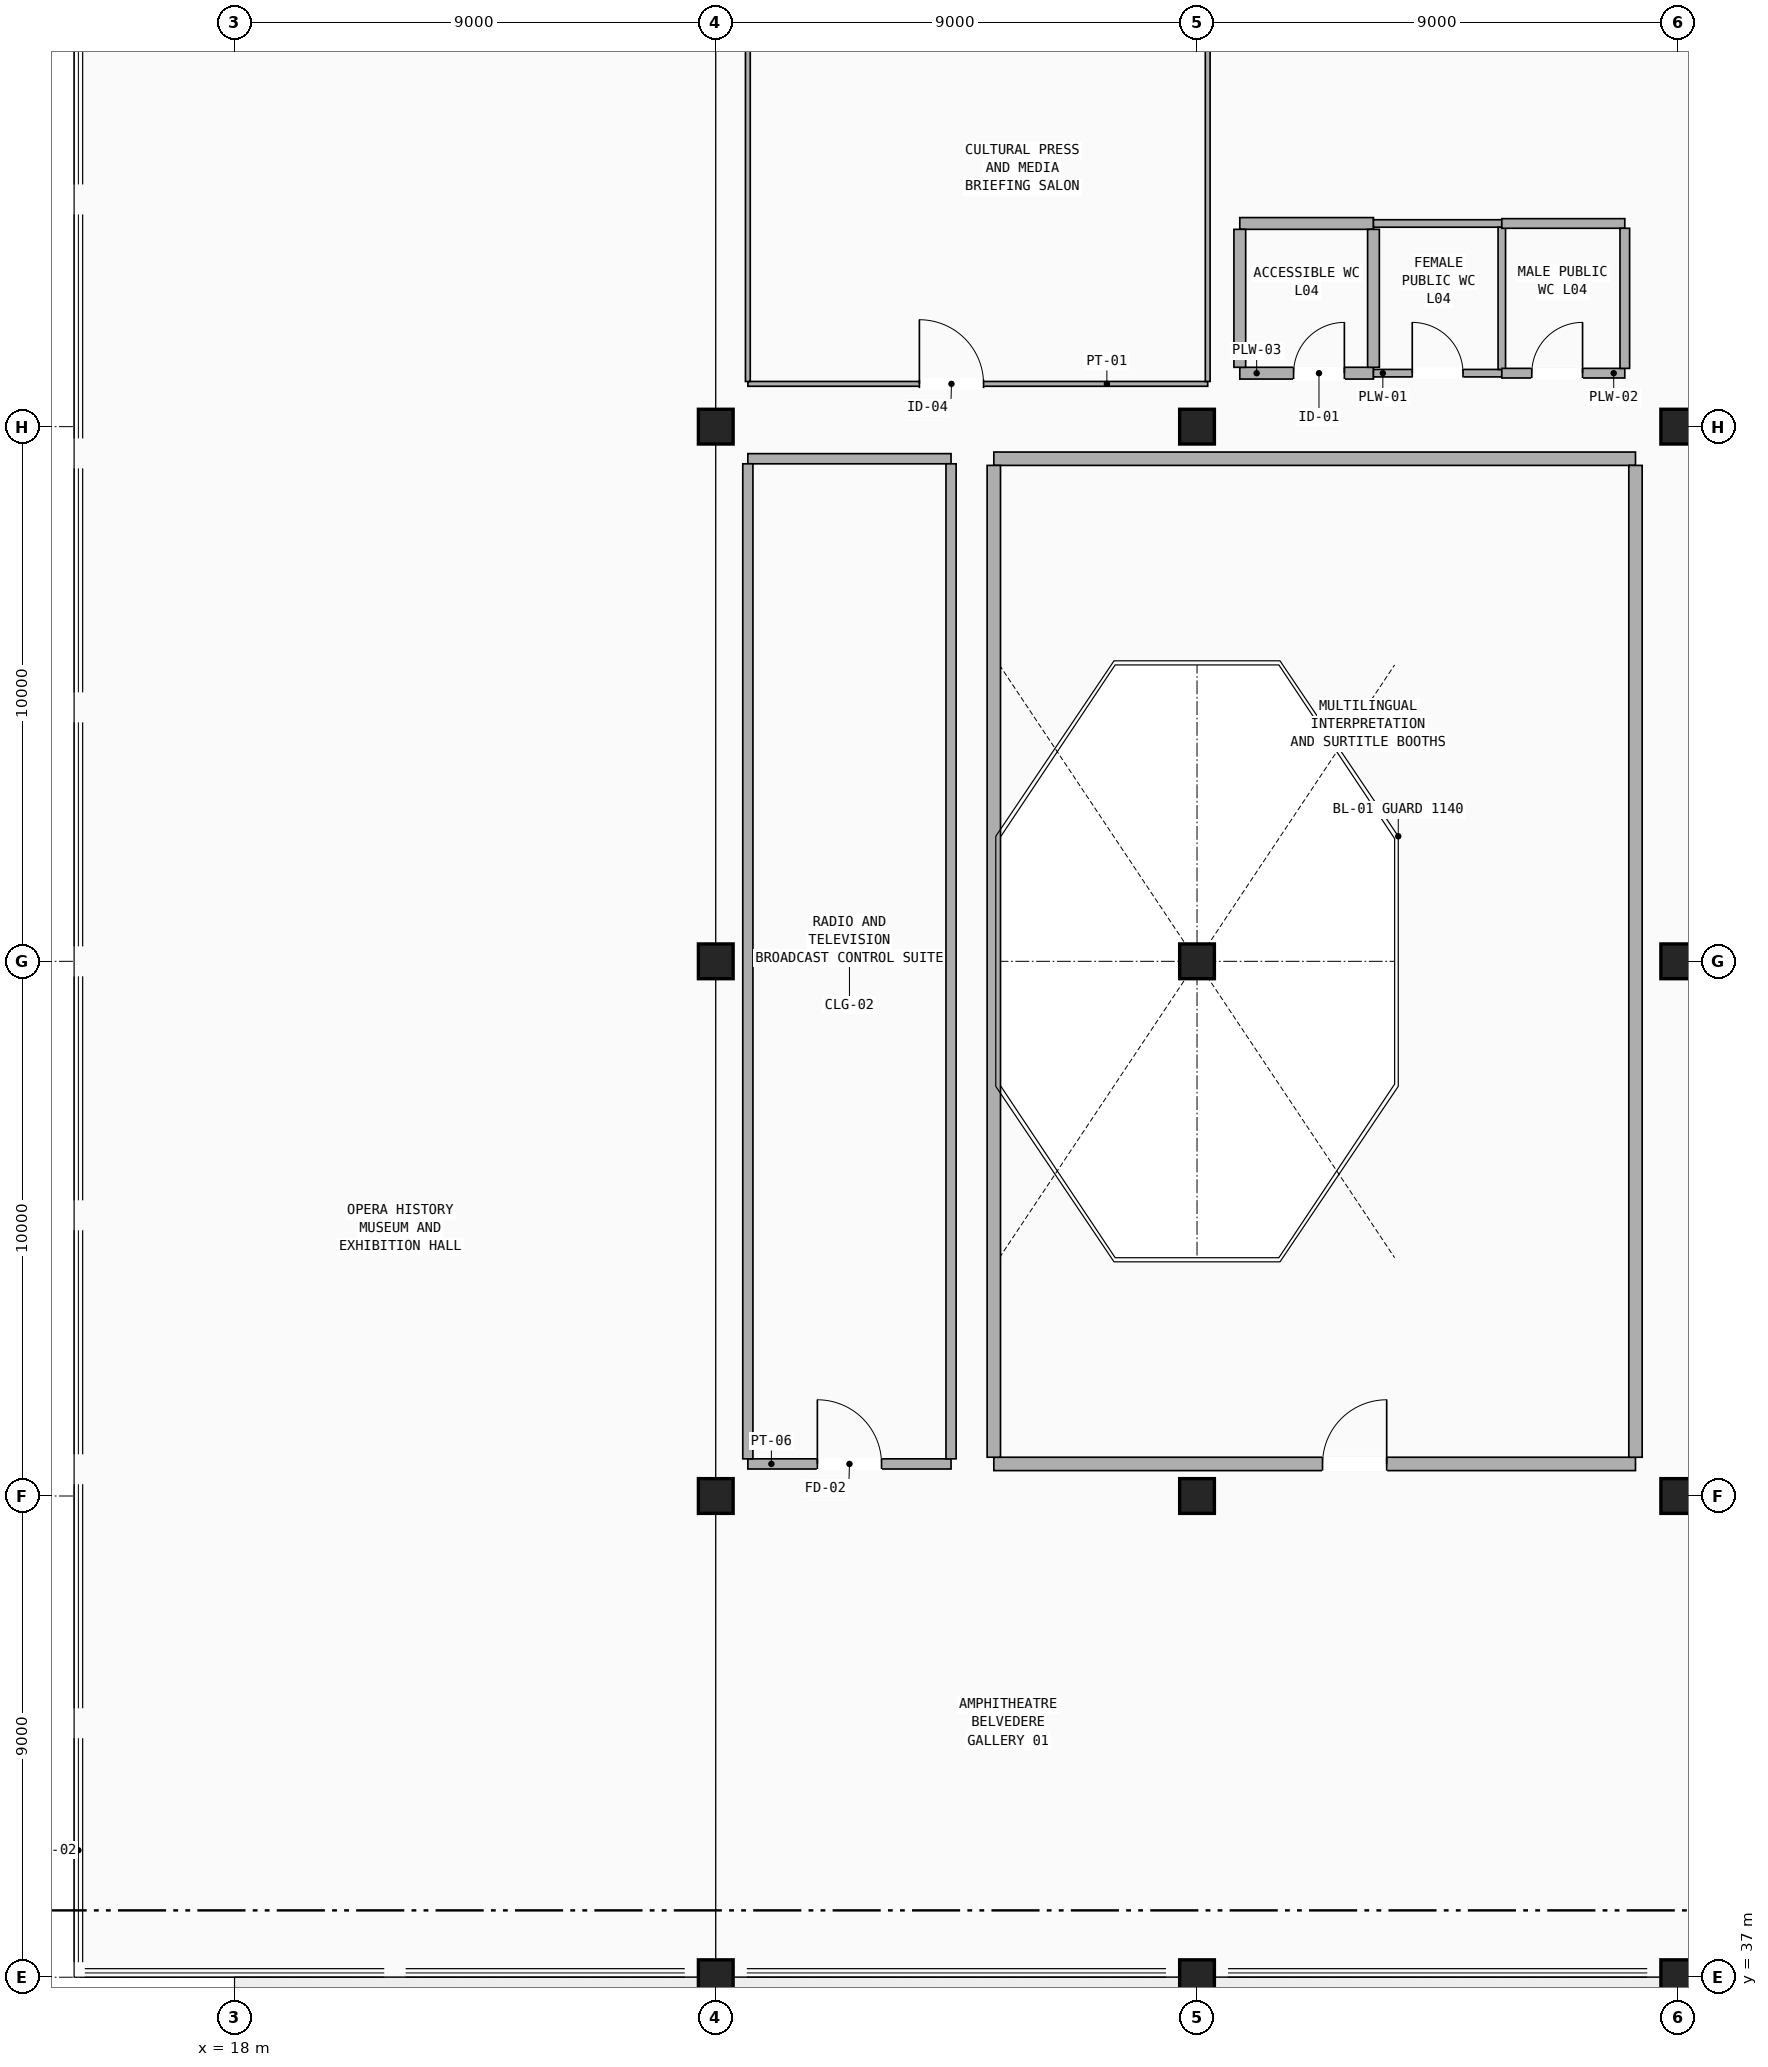
"""IFC4 building model, lengths in metres.
Left out: names, types, materials, properties, quantities, classifications, styles, units other than length and angle.
Written with IfcOpenShell. Run it as: python <this file> out.ifc"""

import sys

from ifc_helpers import new_model, si_unit, direction, frame, frame_2d, origin, origin_2d, place, context, subcontext, project, spatial, rectangle, extrude, element, fill, save


model = new_model("IFC4")
c1 = context("Model", 3, precision=1e-05, world=origin(), true_north=direction((0.0, 1.0)))
c2 = subcontext(c1, "Body", "Model", "MODEL_VIEW")
j1 = project(units=[si_unit("LENGTHUNIT", "METRE"), si_unit("PLANEANGLEUNIT", "RADIAN")], contexts=[c1])
p1 = place(None, origin())
s1 = spatial("IfcSite", under=j1, at=p1, CompositionType="ELEMENT")
p2 = place(p1, origin())
s2 = spatial("IfcBuilding", under=s1, at=p2, CompositionType="ELEMENT")
p3 = place(p2, frame((0.0, 0.0, 17.68)))
s3 = spatial("IfcBuildingStorey", under=s2, at=p3, CompositionType="ELEMENT", Elevation=17.68)
for number, where, z_axis, x_axis in (
    (1, (27.0, 37.0, 0.0), (0.0, 0.0, 1.0), (1.0, 0.0, 0.0)),
    (2, (27.0, 46.0, 0.0), (0.0, 0.0, 1.0), (1.0, 0.0, 0.0)),
    (3, (27.0, 56.0, 0.0), (0.0, 0.0, 1.0), (1.0, 0.0, 0.0)),
    (4, (27.0, 66.0, 0.0), (0.0, 0.0, 1.0), (1.0, 0.0, 0.0)),
    (5, (36.0, 37.0, 0.0), (0.0, 0.0, 1.0), (1.0, 0.0, 0.0)),
    (6, (36.0, 46.0, 0.0), (0.0, 0.0, 1.0), (1.0, 0.0, 0.0)),
    (7, (36.0, 56.0, 0.0), (0.0, 0.0, 1.0), (1.0, 0.0, 0.0)),
    (8, (36.0, 66.0, 0.0), (0.0, 0.0, 1.0), (1.0, 0.0, 0.0)),
    (9, (45.0, 37.0, 0.0), (0.0, 0.0, 1.0), (1.0, 0.0, 0.0)),
    (10, (45.0, 46.0, 0.0), (0.0, 0.0, 1.0), (1.0, 0.0, 0.0)),
    (11, (45.0, 56.0, 0.0), (0.0, 0.0, 1.0), (1.0, 0.0, 0.0)),
    (12, (45.0, 66.0, 0.0), (0.0, 0.0, 1.0), (1.0, 0.0, 0.0)),
):
    element("IfcColumn", number, at=place(p3, frame(where, z_axis=z_axis, x_axis=x_axis)), inside=s3, PredefinedType="COLUMN", context=c2, shape_type="SweptSolid", body=[
        extrude(rectangle(XDim=0.65, YDim=0.65, at=origin_2d()), origin(), (0.0, 0.0, 1.0), 4.08),
    ])
p4 = place(p3, frame((36.8, 67.0, 0.0), z_axis=(0.0, 0.0, 1.0), x_axis=(1.0, 0.0, 0.0)))
e13 = element("IfcWall", 13, at=p4, inside=s3, PredefinedType="PLUMBINGWALL", context=c2, shape_type="SweptSolid", body=[
    extrude(rectangle(XDim=2.5, YDim=0.22, at=frame_2d((1.25, 0.0))), origin(), (0.0, 0.0, 1.0), 3.84),
])
p5 = place(p4, frame((1.006, 0.0, 0.0)))
e14 = element("IfcOpeningElement", 14, at=p5, cuts=e13, PredefinedType="OPENING", context=c2, shape_type="SweptSolid", body=[
    extrude(rectangle(XDim=0.95, YDim=2.15, at=frame_2d((0.475, 1.075))), frame((0.0, 0.12, 0.0), z_axis=(0.0, -1.0, 0.0), x_axis=(1.0, 0.0, 0.0)), (0.0, 0.0, 1.0), 0.24),
])
p6 = place(p3, frame((36.8, 69.8, 0.0), z_axis=(0.0, 0.0, 1.0), x_axis=(1.0, 0.0, 0.0)))
e15 = element("IfcWall", 15, at=p6, inside=s3, PredefinedType="PLUMBINGWALL", context=c2, shape_type="SweptSolid", body=[
    extrude(rectangle(XDim=2.5, YDim=0.22, at=frame_2d((1.25, 0.0))), origin(), (0.0, 0.0, 1.0), 3.84),
])
for number, where, z_axis, x_axis in (
    (16, (36.8, 67.11, 0.0), (0.0, 0.0, 1.0), (0.0, 1.0, 0.0)),
    (17, (39.3, 67.11, 0.0), (0.0, 0.0, 1.0), (0.0, 1.0, 0.0)),
):
    element("IfcWall", number, at=place(p3, frame(where, z_axis=z_axis, x_axis=x_axis)), inside=s3, PredefinedType="PLUMBINGWALL", context=c2, shape_type="SweptSolid", body=[
        extrude(rectangle(XDim=2.58, YDim=0.22, at=frame_2d((1.29, 0.0))), origin(), (0.0, 0.0, 1.0), 3.84),
    ])
p7 = place(p3, frame((39.3, 67.0, 0.0), z_axis=(0.0, 0.0, 1.0), x_axis=(1.0, 0.0, 0.0)))
e18 = element("IfcWall", 18, at=p7, inside=s3, PredefinedType="PLUMBINGWALL", context=c2, shape_type="SweptSolid", body=[
    extrude(rectangle(XDim=2.4, YDim=0.14, at=frame_2d((1.2, 0.0))), origin(), (0.0, 0.0, 1.0), 3.84),
])
p8 = place(p7, frame((0.725, 0.0, 0.0)))
e19 = element("IfcOpeningElement", 19, at=p8, cuts=e18, PredefinedType="OPENING", context=c2, shape_type="SweptSolid", body=[
    extrude(rectangle(XDim=0.95, YDim=2.15, at=frame_2d((0.475, 1.075))), frame((0.0, 0.08, 0.0), z_axis=(0.0, -1.0, 0.0), x_axis=(1.0, 0.0, 0.0)), (0.0, 0.0, 1.0), 0.16),
])
p9 = place(p3, frame((39.3, 69.8, 0.0), z_axis=(0.0, 0.0, 1.0), x_axis=(1.0, 0.0, 0.0)))
e20 = element("IfcWall", 20, at=p9, inside=s3, PredefinedType="PLUMBINGWALL", context=c2, shape_type="SweptSolid", body=[
    extrude(rectangle(XDim=2.4, YDim=0.14, at=frame_2d((1.2, 0.0))), origin(), (0.0, 0.0, 1.0), 3.84),
])
p10 = place(p3, frame((41.7, 67.07, 0.0), z_axis=(0.0, 0.0, 1.0), x_axis=(0.0, 1.0, 0.0)))
e21 = element("IfcWall", 21, at=p10, inside=s3, PredefinedType="PLUMBINGWALL", context=c2, shape_type="SweptSolid", body=[
    extrude(rectangle(XDim=2.66, YDim=0.14, at=frame_2d((1.33, 0.0))), origin(), (0.0, 0.0, 1.0), 3.84),
])
p11 = place(p3, frame((41.7, 67.0, 0.0), z_axis=(0.0, 0.0, 1.0), x_axis=(1.0, 0.0, 0.0)))
e22 = element("IfcWall", 22, at=p11, inside=s3, PredefinedType="PLUMBINGWALL", context=c2, shape_type="SweptSolid", body=[
    extrude(rectangle(XDim=2.3, YDim=0.18, at=frame_2d((1.15, 0.0))), origin(), (0.0, 0.0, 1.0), 3.84),
])
p12 = place(p11, frame((0.56, 0.0, 0.0)))
e23 = element("IfcOpeningElement", 23, at=p12, cuts=e22, PredefinedType="OPENING", context=c2, shape_type="SweptSolid", body=[
    extrude(rectangle(XDim=0.95, YDim=2.15, at=frame_2d((0.475, 1.075))), frame((0.0, 0.1, 0.0), z_axis=(0.0, -1.0, 0.0), x_axis=(1.0, 0.0, 0.0)), (0.0, 0.0, 1.0), 0.2),
])
p13 = place(p3, frame((41.7, 69.8, 0.0), z_axis=(0.0, 0.0, 1.0), x_axis=(1.0, 0.0, 0.0)))
e24 = element("IfcWall", 24, at=p13, inside=s3, PredefinedType="PLUMBINGWALL", context=c2, shape_type="SweptSolid", body=[
    extrude(rectangle(XDim=2.3, YDim=0.18, at=frame_2d((1.15, 0.0))), origin(), (0.0, 0.0, 1.0), 3.84),
])
p14 = place(p3, frame((44.0, 67.09, 0.0), z_axis=(0.0, 0.0, 1.0), x_axis=(0.0, 1.0, 0.0)))
e25 = element("IfcWall", 25, at=p14, inside=s3, PredefinedType="PLUMBINGWALL", context=c2, shape_type="SweptSolid", body=[
    extrude(rectangle(XDim=2.62, YDim=0.18, at=frame_2d((1.31, 0.0))), origin(), (0.0, 0.0, 1.0), 3.84),
])
p15 = place(p3, frame((27.6, 46.6, 0.0), z_axis=(0.0, 0.0, 1.0), x_axis=(1.0, 0.0, 0.0)))
e26 = element("IfcWall", 26, at=p15, inside=s3, PredefinedType="PARTITIONING", context=c2, shape_type="SweptSolid", body=[
    extrude(rectangle(XDim=3.8, YDim=0.19, at=frame_2d((1.9, 0.0))), origin(), (0.0, 0.0, 1.0), 3.84),
])
p16 = place(p15, frame((1.3, 0.0, 0.0)))
e27 = element("IfcOpeningElement", 27, at=p16, cuts=e26, PredefinedType="OPENING", context=c2, shape_type="SweptSolid", body=[
    extrude(rectangle(XDim=1.2, YDim=2.2, at=frame_2d((0.6, 1.1))), frame((0.0, 0.105, 0.0), z_axis=(0.0, -1.0, 0.0), x_axis=(1.0, 0.0, 0.0)), (0.0, 0.0, 1.0), 0.21),
])
p17 = place(p3, frame((27.6, 65.4, 0.0), z_axis=(0.0, 0.0, 1.0), x_axis=(1.0, 0.0, 0.0)))
e28 = element("IfcWall", 28, at=p17, inside=s3, PredefinedType="PARTITIONING", context=c2, shape_type="SweptSolid", body=[
    extrude(rectangle(XDim=3.8, YDim=0.19, at=frame_2d((1.9, 0.0))), origin(), (0.0, 0.0, 1.0), 3.84),
])
for number, where, z_axis, x_axis in (
    (29, (27.6, 46.695, 0.0), (0.0, 0.0, 1.0), (0.0, 1.0, 0.0)),
    (30, (31.4, 46.695, 0.0), (0.0, 0.0, 1.0), (0.0, 1.0, 0.0)),
):
    element("IfcWall", number, at=place(p3, frame(where, z_axis=z_axis, x_axis=x_axis)), inside=s3, PredefinedType="PARTITIONING", context=c2, shape_type="SweptSolid", body=[
        extrude(rectangle(XDim=18.61, YDim=0.19, at=frame_2d((9.305, 0.0))), origin(), (0.0, 0.0, 1.0), 2.82),
    ])
p18 = place(p3, frame((32.2, 46.6, 0.0), z_axis=(0.0, 0.0, 1.0), x_axis=(1.0, 0.0, 0.0)))
e31 = element("IfcWall", 31, at=p18, inside=s3, PredefinedType="PARTITIONING", context=c2, shape_type="SweptSolid", body=[
    extrude(rectangle(XDim=12.0, YDim=0.25, at=frame_2d((6.0, 0.0))), origin(), (0.0, 0.0, 1.0), 2.97),
])
p19 = place(p18, frame((6.147, 0.0, 0.0)))
e32 = element("IfcOpeningElement", 32, at=p19, cuts=e31, PredefinedType="OPENING", context=c2, shape_type="SweptSolid", body=[
    extrude(rectangle(XDim=1.2, YDim=2.2, at=frame_2d((0.6, 1.1))), frame((0.0, 0.135, 0.0), z_axis=(0.0, -1.0, 0.0), x_axis=(1.0, 0.0, 0.0)), (0.0, 0.0, 1.0), 0.27),
])
p20 = place(p3, frame((32.2, 65.4, 0.0), z_axis=(0.0, 0.0, 1.0), x_axis=(1.0, 0.0, 0.0)))
e33 = element("IfcWall", 33, at=p20, inside=s3, PredefinedType="PARTITIONING", context=c2, shape_type="SweptSolid", body=[
    extrude(rectangle(XDim=12.0, YDim=0.25, at=frame_2d((6.0, 0.0))), origin(), (0.0, 0.0, 1.0), 3.12),
])
p21 = place(p3, frame((32.2, 46.725, 0.0), z_axis=(0.0, 0.0, 1.0), x_axis=(0.0, 1.0, 0.0)))
e34 = element("IfcWall", 34, at=p21, inside=s3, PredefinedType="PARTITIONING", context=c2, shape_type="SweptSolid", body=[
    extrude(rectangle(XDim=18.55, YDim=0.25, at=frame_2d((9.275, 0.0))), origin(), (0.0, 0.0, 1.0), 2.82),
])
p22 = place(p3, frame((44.2, 46.725, 0.0), z_axis=(0.0, 0.0, 1.0), x_axis=(0.0, 1.0, 0.0)))
e35 = element("IfcWall", 35, at=p22, inside=s3, PredefinedType="PARTITIONING", context=c2, shape_type="SweptSolid", body=[
    extrude(rectangle(XDim=18.55, YDim=0.25, at=frame_2d((9.275, 0.0))), origin(), (0.0, 0.0, 1.0), 2.97),
])
p23 = place(p3, frame((27.6, 66.8, 0.0), z_axis=(0.0, 0.0, 1.0), x_axis=(1.0, 0.0, 0.0)))
e36 = element("IfcWall", 36, at=p23, inside=s3, PredefinedType="PARTITIONING", context=c2, shape_type="SweptSolid", body=[
    extrude(rectangle(XDim=8.6, YDim=0.09, at=frame_2d((4.3, 0.0))), origin(), (0.0, 0.0, 1.0), 3.14),
])
p24 = place(p23, frame((3.208, 0.0, 0.0)))
e37 = element("IfcOpeningElement", 37, at=p24, cuts=e36, PredefinedType="OPENING", context=c2, shape_type="SweptSolid", body=[
    extrude(rectangle(XDim=1.2, YDim=2.2, at=frame_2d((0.6, 1.1))), frame((0.0, 0.055, 0.0), z_axis=(0.0, -1.0, 0.0), x_axis=(1.0, 0.0, 0.0)), (0.0, 0.0, 1.0), 0.11),
])
p25 = place(p3, frame((27.6, 66.845, 0.0), z_axis=(0.0, 0.0, 1.0), x_axis=(0.0, 1.0, 0.0)))
e38 = element("IfcWall", 38, at=p25, inside=s3, PredefinedType="PARTITIONING", context=c2, shape_type="SweptSolid", body=[
    extrude(rectangle(XDim=7.31, YDim=0.09, at=frame_2d((3.655, 0.0))), origin(), (0.0, 0.0, 1.0), 3.413),
])
p26 = place(p3, frame((36.2, 66.845, 0.0), z_axis=(0.0, 0.0, 1.0), x_axis=(0.0, 1.0, 0.0)))
e39 = element("IfcWall", 39, at=p26, inside=s3, PredefinedType="PARTITIONING", context=c2, shape_type="SweptSolid", body=[
    extrude(rectangle(XDim=7.31, YDim=0.09, at=frame_2d((3.655, 0.0))), origin(), (0.0, 0.0, 1.0), 3.14),
])
p27 = place(p5, origin())
e40 = element("IfcDoor", 40, at=p27, inside=s3, OperationType="SINGLE_SWING_RIGHT", PredefinedType="DOOR", context=c2, shape_type="SweptSolid", body=[
    extrude(rectangle(XDim=0.95, YDim=2.15, at=frame_2d((0.475, 1.075))), frame((0.0, 0.025, 0.0), z_axis=(0.0, -1.0, 0.0), x_axis=(1.0, 0.0, 0.0)), (0.0, 0.0, 1.0), 0.05),
])
fill(e14, e40)
p28 = place(p8, origin())
e41 = element("IfcDoor", 41, at=p28, inside=s3, OperationType="SINGLE_SWING_LEFT", PredefinedType="DOOR", context=c2, shape_type="SweptSolid", body=[
    extrude(rectangle(XDim=0.95, YDim=2.15, at=frame_2d((0.475, 1.075))), frame((0.0, 0.025, 0.0), z_axis=(0.0, -1.0, 0.0), x_axis=(1.0, 0.0, 0.0)), (0.0, 0.0, 1.0), 0.05),
])
fill(e19, e41)
p29 = place(p12, origin())
e42 = element("IfcDoor", 42, at=p29, inside=s3, OperationType="SINGLE_SWING_RIGHT", PredefinedType="DOOR", context=c2, shape_type="SweptSolid", body=[
    extrude(rectangle(XDim=0.95, YDim=2.15, at=frame_2d((0.475, 1.075))), frame((0.0, 0.025, 0.0), z_axis=(0.0, -1.0, 0.0), x_axis=(1.0, 0.0, 0.0)), (0.0, 0.0, 1.0), 0.05),
])
fill(e23, e42)
p30 = place(p16, origin())
e43 = element("IfcDoor", 43, at=p30, inside=s3, OperationType="SINGLE_SWING_LEFT", PredefinedType="DOOR", context=c2, shape_type="SweptSolid", body=[
    extrude(rectangle(XDim=1.2, YDim=2.2, at=frame_2d((0.6, 1.1))), frame((0.0, 0.025, 0.0), z_axis=(0.0, -1.0, 0.0), x_axis=(1.0, 0.0, 0.0)), (0.0, 0.0, 1.0), 0.05),
])
fill(e27, e43)
p31 = place(p19, origin())
e44 = element("IfcDoor", 44, at=p31, inside=s3, OperationType="SINGLE_SWING_RIGHT", PredefinedType="DOOR", context=c2, shape_type="SweptSolid", body=[
    extrude(rectangle(XDim=1.2, YDim=2.2, at=frame_2d((0.6, 1.1))), frame((0.0, 0.025, 0.0), z_axis=(0.0, -1.0, 0.0), x_axis=(1.0, 0.0, 0.0)), (0.0, 0.0, 1.0), 0.05),
])
fill(e32, e44)
p32 = place(p24, origin())
e45 = element("IfcDoor", 45, at=p32, inside=s3, OperationType="SINGLE_SWING_LEFT", PredefinedType="DOOR", context=c2, shape_type="SweptSolid", body=[
    extrude(rectangle(XDim=1.2, YDim=2.2, at=frame_2d((0.6, 1.1))), frame((0.0, 0.025, 0.0), z_axis=(0.0, -1.0, 0.0), x_axis=(1.0, 0.0, 0.0)), (0.0, 0.0, 1.0), 0.05),
])
fill(e37, e45)
save(model, sys.argv[1])
